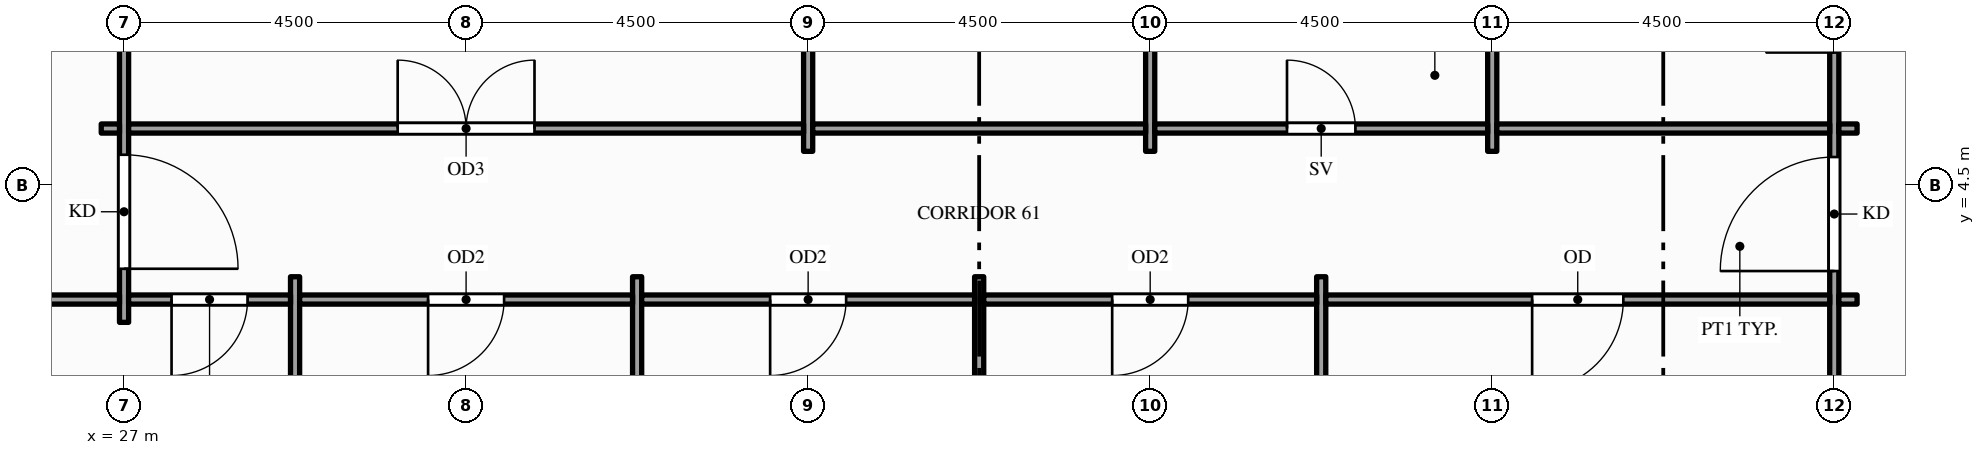
"""IFC4 building model, lengths in metres.
Left out: names, types, materials, properties, quantities, classifications, styles, units other than length and angle.
Written with IfcOpenShell. Run it as: python <this file> out.ifc"""

import sys

from ifc_helpers import new_model, si_unit, direction, frame, frame_2d, origin, place, context, subcontext, project, spatial, rectangle, extrude, element, fill, save


model = new_model("IFC4")
c1 = context("Model", 3, precision=1e-05, world=origin(), true_north=direction((0.0, 1.0)))
c2 = subcontext(c1, "Body", "Model", "MODEL_VIEW")
j1 = project(units=[si_unit("LENGTHUNIT", "METRE"), si_unit("PLANEANGLEUNIT", "RADIAN")], contexts=[c1])
p1 = place(None, origin())
s1 = spatial("IfcSite", under=j1, at=p1, CompositionType="ELEMENT")
p2 = place(p1, origin())
s2 = spatial("IfcBuilding", under=s1, at=p2, CompositionType="ELEMENT")
p3 = place(p2, frame((0.0, 0.0, 195.0)))
s3 = spatial("IfcBuildingStorey", under=s2, at=p3, CompositionType="ELEMENT", Elevation=195.0)
p4 = place(p3, frame((27.0, 2.7, 0.0), z_axis=(0.0, 0.0, 1.0), x_axis=(0.0, 1.0, 0.0)))
e1 = element("IfcWall", 1, at=p4, inside=s3, PredefinedType="PARTITIONING", context=c2, shape_type="SweptSolid", body=[
    extrude(rectangle(XDim=14.1, YDim=0.12, at=frame_2d((7.05, 0.0))), origin(), (0.0, 0.0, 1.0), 2.87),
])
p5 = place(p4, frame((0.705, 0.0, 0.0)))
e2 = element("IfcOpeningElement", 2, at=p5, cuts=e1, PredefinedType="OPENING", context=c2, shape_type="SweptSolid", body=[
    extrude(rectangle(XDim=1.5, YDim=2.1, at=frame_2d((0.75, 1.05))), frame((0.0, 0.07, 0.0), z_axis=(0.0, -1.0, 0.0), x_axis=(1.0, 0.0, 0.0)), (0.0, 0.0, 1.0), 0.14),
])
p6 = place(p4, frame((11.895, 0.0, 0.0)))
e3 = element("IfcOpeningElement", 3, at=p6, cuts=e1, PredefinedType="OPENING", context=c2, shape_type="SweptSolid", body=[
    extrude(rectangle(XDim=1.5, YDim=2.1, at=frame_2d((0.75, 1.05))), frame((0.0, 0.07, 0.0), z_axis=(0.0, -1.0, 0.0), x_axis=(1.0, 0.0, 0.0)), (0.0, 0.0, 1.0), 0.14),
])
for number, where, z_axis, x_axis in (
    (4, (29.25, -1.35, 0.0), (0.0, 0.0, 1.0), (0.0, 1.0, 0.0)),
    (5, (33.75, -1.35, 0.0), (0.0, 0.0, 1.0), (0.0, 1.0, 0.0)),
):
    element("IfcWall", number, at=place(p3, frame(where, z_axis=z_axis, x_axis=x_axis)), inside=s3, PredefinedType="PARTITIONING", context=c2, shape_type="SweptSolid", body=[
        extrude(rectangle(XDim=4.65, YDim=0.12, at=frame_2d((2.325, 0.0))), origin(), (0.0, 0.0, 1.0), 2.87),
    ])
p7 = place(p3, frame((36.0, 4.95, 0.0), z_axis=(0.0, 0.0, 1.0), x_axis=(0.0, 1.0, 0.0)))
e6 = element("IfcWall", 6, at=p7, inside=s3, PredefinedType="PARTITIONING", context=c2, shape_type="SweptSolid", body=[
    extrude(rectangle(XDim=9.6, YDim=0.12, at=frame_2d((4.8, 0.0))), origin(), (0.0, 0.0, 1.0), 2.87),
])
p8 = place(p3, frame((38.25, -1.35, 0.0), z_axis=(0.0, 0.0, 1.0), x_axis=(0.0, 1.0, 0.0)))
e7 = element("IfcWall", 7, at=p8, inside=s3, PredefinedType="PARTITIONING", context=c2, shape_type="SweptSolid", body=[
    extrude(rectangle(XDim=4.65, YDim=0.12, at=frame_2d((2.325, 0.0))), origin(), (0.0, 0.0, 1.0), 2.87),
])
p9 = place(p3, frame((40.5, 4.95, 0.0), z_axis=(0.0, 0.0, 1.0), x_axis=(0.0, 1.0, 0.0)))
e8 = element("IfcWall", 8, at=p9, inside=s3, PredefinedType="PARTITIONING", context=c2, shape_type="SweptSolid", body=[
    extrude(rectangle(XDim=9.6, YDim=0.12, at=frame_2d((4.8, 0.0))), origin(), (0.0, 0.0, 1.0), 2.87),
])
p10 = place(p3, frame((42.75, -1.35, 0.0), z_axis=(0.0, 0.0, 1.0), x_axis=(0.0, 1.0, 0.0)))
e9 = element("IfcWall", 9, at=p10, inside=s3, PredefinedType="PARTITIONING", context=c2, shape_type="SweptSolid", body=[
    extrude(rectangle(XDim=4.65, YDim=0.12, at=frame_2d((2.325, 0.0))), origin(), (0.0, 0.0, 1.0), 2.87),
])
p11 = place(p3, frame((45.0, 4.95, 0.0), z_axis=(0.0, 0.0, 1.0), x_axis=(0.0, 1.0, 0.0)))
e10 = element("IfcWall", 10, at=p11, inside=s3, PredefinedType="PARTITIONING", context=c2, shape_type="SweptSolid", body=[
    extrude(rectangle(XDim=9.6, YDim=0.12, at=frame_2d((4.8, 0.0))), origin(), (0.0, 0.0, 1.0), 2.87),
])
p12 = place(p3, frame((49.5, -1.35, 0.0), z_axis=(0.0, 0.0, 1.0), x_axis=(0.0, 1.0, 0.0)))
e11 = element("IfcWall", 11, at=p12, inside=s3, PredefinedType="PARTITIONING", context=c2, shape_type="SweptSolid", body=[
    extrude(rectangle(XDim=22.2, YDim=0.12, at=frame_2d((11.1, 0.0))), origin(), (0.0, 0.0, 1.0), 2.87),
])
p13 = place(p12, frame((4.725, 0.0, 0.0)))
e12 = element("IfcOpeningElement", 12, at=p13, cuts=e11, PredefinedType="OPENING", context=c2, shape_type="SweptSolid", body=[
    extrude(rectangle(XDim=1.5, YDim=2.1, at=frame_2d((0.75, 1.05))), frame((0.0, 0.07, 0.0), z_axis=(0.0, -1.0, 0.0), x_axis=(1.0, 0.0, 0.0)), (0.0, 0.0, 1.0), 0.14),
])
p14 = place(p12, frame((15.975, 0.0, 0.0)))
e13 = element("IfcOpeningElement", 13, at=p14, cuts=e11, PredefinedType="OPENING", context=c2, shape_type="SweptSolid", body=[
    extrude(rectangle(XDim=1.5, YDim=2.1, at=frame_2d((0.75, 1.05))), frame((0.0, 0.07, 0.0), z_axis=(0.0, -1.0, 0.0), x_axis=(1.0, 0.0, 0.0)), (0.0, 0.0, 1.0), 0.14),
])
p15 = place(p12, frame((7.6, 0.0, 0.0)))
e14 = element("IfcOpeningElement", 14, at=p15, cuts=e11, PredefinedType="OPENING", context=c2, shape_type="SweptSolid", body=[
    extrude(rectangle(XDim=0.9, YDim=2.1, at=frame_2d((0.45, 1.05))), frame((0.0, 0.07, 0.0), z_axis=(0.0, -1.0, 0.0), x_axis=(1.0, 0.0, 0.0)), (0.0, 0.0, 1.0), 0.14),
])
p16 = place(p12, frame((10.65, 0.0, 0.0)))
e15 = element("IfcOpeningElement", 15, at=p16, cuts=e11, PredefinedType="OPENING", context=c2, shape_type="SweptSolid", body=[
    extrude(rectangle(XDim=0.9, YDim=2.1, at=frame_2d((0.45, 1.05))), frame((0.0, 0.07, 0.0), z_axis=(0.0, -1.0, 0.0), x_axis=(1.0, 0.0, 0.0)), (0.0, 0.0, 1.0), 0.14),
])
p17 = place(p12, frame((13.6, 0.0, 0.0)))
e16 = element("IfcOpeningElement", 16, at=p17, cuts=e11, PredefinedType="OPENING", context=c2, shape_type="SweptSolid", body=[
    extrude(rectangle(XDim=1.0, YDim=2.1, at=frame_2d((0.5, 1.05))), frame((0.0, 0.07, 0.0), z_axis=(0.0, -1.0, 0.0), x_axis=(1.0, 0.0, 0.0)), (0.0, 0.0, 1.0), 0.14),
])
p18 = place(p3, frame((24.81, 3.0, 0.0), z_axis=(0.0, 0.0, 1.0), x_axis=(1.0, 0.0, 0.0)))
e17 = element("IfcWall", 17, at=p18, inside=s3, PredefinedType="PARTITIONING", context=c2, shape_type="SweptSolid", body=[
    extrude(rectangle(XDim=2.13, YDim=0.12, at=frame_2d((1.065, 0.0))), origin(), (0.0, 0.0, 1.0), 2.76),
])
p19 = place(p3, frame((27.06, 3.0, 0.0), z_axis=(0.0, 0.0, 1.0), x_axis=(1.0, 0.0, 0.0)))
e18 = element("IfcWall", 18, at=p19, inside=s3, PredefinedType="PARTITIONING", context=c2, shape_type="SweptSolid", body=[
    extrude(rectangle(XDim=2.13, YDim=0.12, at=frame_2d((1.065, 0.0))), origin(), (0.0, 0.0, 1.0), 2.87),
])
p20 = place(p19, frame((0.565, 0.0, 0.0)))
e19 = element("IfcOpeningElement", 19, at=p20, cuts=e18, PredefinedType="OPENING", context=c2, shape_type="SweptSolid", body=[
    extrude(rectangle(XDim=1.0, YDim=2.1, at=frame_2d((0.5, 1.05))), frame((0.0, 0.07, 0.0), z_axis=(0.0, -1.0, 0.0), x_axis=(1.0, 0.0, 0.0)), (0.0, 0.0, 1.0), 0.14),
])
p21 = place(p3, frame((29.31, 3.0, 0.0), z_axis=(0.0, 0.0, 1.0), x_axis=(1.0, 0.0, 0.0)))
e20 = element("IfcWall", 20, at=p21, inside=s3, PredefinedType="PARTITIONING", context=c2, shape_type="SweptSolid", body=[
    extrude(rectangle(XDim=4.38, YDim=0.12, at=frame_2d((2.19, 0.0))), origin(), (0.0, 0.0, 1.0), 2.87),
])
p22 = place(p21, frame((1.69, 0.0, 0.0)))
e21 = element("IfcOpeningElement", 21, at=p22, cuts=e20, PredefinedType="OPENING", context=c2, shape_type="SweptSolid", body=[
    extrude(rectangle(XDim=1.0, YDim=2.1, at=frame_2d((0.5, 1.05))), frame((0.0, 0.07, 0.0), z_axis=(0.0, -1.0, 0.0), x_axis=(1.0, 0.0, 0.0)), (0.0, 0.0, 1.0), 0.14),
])
p23 = place(p3, frame((33.81, 3.0, 0.0), z_axis=(0.0, 0.0, 1.0), x_axis=(1.0, 0.0, 0.0)))
e22 = element("IfcWall", 22, at=p23, inside=s3, PredefinedType="PARTITIONING", context=c2, shape_type="SweptSolid", body=[
    extrude(rectangle(XDim=4.38, YDim=0.12, at=frame_2d((2.19, 0.0))), origin(), (0.0, 0.0, 1.0), 2.87),
])
p24 = place(p23, frame((1.69, 0.0, 0.0)))
e23 = element("IfcOpeningElement", 23, at=p24, cuts=e22, PredefinedType="OPENING", context=c2, shape_type="SweptSolid", body=[
    extrude(rectangle(XDim=1.0, YDim=2.1, at=frame_2d((0.5, 1.05))), frame((0.0, 0.07, 0.0), z_axis=(0.0, -1.0, 0.0), x_axis=(1.0, 0.0, 0.0)), (0.0, 0.0, 1.0), 0.14),
])
p25 = place(p3, frame((38.31, 3.0, 0.0), z_axis=(0.0, 0.0, 1.0), x_axis=(1.0, 0.0, 0.0)))
e24 = element("IfcWall", 24, at=p25, inside=s3, PredefinedType="PARTITIONING", context=c2, shape_type="SweptSolid", body=[
    extrude(rectangle(XDim=4.38, YDim=0.12, at=frame_2d((2.19, 0.0))), origin(), (0.0, 0.0, 1.0), 2.87),
])
p26 = place(p25, frame((1.69, 0.0, 0.0)))
e25 = element("IfcOpeningElement", 25, at=p26, cuts=e24, PredefinedType="OPENING", context=c2, shape_type="SweptSolid", body=[
    extrude(rectangle(XDim=1.0, YDim=2.1, at=frame_2d((0.5, 1.05))), frame((0.0, 0.07, 0.0), z_axis=(0.0, -1.0, 0.0), x_axis=(1.0, 0.0, 0.0)), (0.0, 0.0, 1.0), 0.14),
])
p27 = place(p3, frame((42.81, 3.0, 0.0), z_axis=(0.0, 0.0, 1.0), x_axis=(1.0, 0.0, 0.0)))
e26 = element("IfcWall", 26, at=p27, inside=s3, PredefinedType="PARTITIONING", context=c2, shape_type="SweptSolid", body=[
    extrude(rectangle(XDim=6.63, YDim=0.12, at=frame_2d((3.315, 0.0))), origin(), (0.0, 0.0, 1.0), 2.87),
])
p28 = place(p27, frame((2.715, 0.0, 0.0)))
e27 = element("IfcOpeningElement", 27, at=p28, cuts=e26, PredefinedType="OPENING", context=c2, shape_type="SweptSolid", body=[
    extrude(rectangle(XDim=1.2, YDim=2.1, at=frame_2d((0.6, 1.05))), frame((0.0, 0.07, 0.0), z_axis=(0.0, -1.0, 0.0), x_axis=(1.0, 0.0, 0.0)), (0.0, 0.0, 1.0), 0.14),
])
for number, where, z_axis, x_axis in (
    (28, (49.56, 3.0, 0.0), (0.0, 0.0, 1.0), (1.0, 0.0, 0.0)),
    (29, (26.7, 5.25, 0.0), (0.0, 0.0, 1.0), (1.0, 0.0, 0.0)),
):
    element("IfcWall", number, at=place(p3, frame(where, z_axis=z_axis, x_axis=x_axis)), inside=s3, PredefinedType="PARTITIONING", context=c2, shape_type="SweptSolid", body=[
        extrude(rectangle(XDim=0.24, YDim=0.12, at=frame_2d((0.12, 0.0))), origin(), (0.0, 0.0, 1.0), 2.87),
    ])
p29 = place(p3, frame((27.06, 5.25, 0.0), z_axis=(0.0, 0.0, 1.0), x_axis=(1.0, 0.0, 0.0)))
e30 = element("IfcWall", 30, at=p29, inside=s3, PredefinedType="PARTITIONING", context=c2, shape_type="SweptSolid", body=[
    extrude(rectangle(XDim=8.88, YDim=0.12, at=frame_2d((4.44, 0.0))), origin(), (0.0, 0.0, 1.0), 2.87),
])
p30 = place(p29, frame((3.54, 0.0, 0.0)))
e31 = element("IfcOpeningElement", 31, at=p30, cuts=e30, PredefinedType="OPENING", context=c2, shape_type="SweptSolid", body=[
    extrude(rectangle(XDim=1.8, YDim=2.1, at=frame_2d((0.9, 1.05))), frame((0.0, 0.07, 0.0), z_axis=(0.0, -1.0, 0.0), x_axis=(1.0, 0.0, 0.0)), (0.0, 0.0, 1.0), 0.14),
])
p31 = place(p3, frame((36.06, 5.25, 0.0), z_axis=(0.0, 0.0, 1.0), x_axis=(1.0, 0.0, 0.0)))
e32 = element("IfcWall", 32, at=p31, inside=s3, PredefinedType="PARTITIONING", context=c2, shape_type="SweptSolid", body=[
    extrude(rectangle(XDim=4.38, YDim=0.12, at=frame_2d((2.19, 0.0))), origin(), (0.0, 0.0, 1.0), 2.87),
])
p32 = place(p3, frame((40.56, 5.25, 0.0), z_axis=(0.0, 0.0, 1.0), x_axis=(1.0, 0.0, 0.0)))
e33 = element("IfcWall", 33, at=p32, inside=s3, PredefinedType="PARTITIONING", context=c2, shape_type="SweptSolid", body=[
    extrude(rectangle(XDim=4.38, YDim=0.12, at=frame_2d((2.19, 0.0))), origin(), (0.0, 0.0, 1.0), 2.87),
])
p33 = place(p32, frame((1.74, 0.0, 0.0)))
e34 = element("IfcOpeningElement", 34, at=p33, cuts=e33, PredefinedType="OPENING", context=c2, shape_type="SweptSolid", body=[
    extrude(rectangle(XDim=0.9, YDim=2.1, at=frame_2d((0.45, 1.05))), frame((0.0, 0.07, 0.0), z_axis=(0.0, -1.0, 0.0), x_axis=(1.0, 0.0, 0.0)), (0.0, 0.0, 1.0), 0.14),
])
p34 = place(p3, frame((45.06, 5.25, 0.0), z_axis=(0.0, 0.0, 1.0), x_axis=(1.0, 0.0, 0.0)))
e35 = element("IfcWall", 35, at=p34, inside=s3, PredefinedType="PARTITIONING", context=c2, shape_type="SweptSolid", body=[
    extrude(rectangle(XDim=4.38, YDim=0.12, at=frame_2d((2.19, 0.0))), origin(), (0.0, 0.0, 1.0), 2.87),
])
p35 = place(p3, frame((49.56, 5.25, 0.0), z_axis=(0.0, 0.0, 1.0), x_axis=(1.0, 0.0, 0.0)))
e36 = element("IfcWall", 36, at=p35, inside=s3, PredefinedType="PARTITIONING", context=c2, shape_type="SweptSolid", body=[
    extrude(rectangle(XDim=0.24, YDim=0.12, at=frame_2d((0.12, 0.0))), origin(), (0.0, 0.0, 1.0), 2.87),
])
p36 = place(p5, origin())
e37 = element("IfcDoor", 37, at=p36, inside=s3, OperationType="SINGLE_SWING_LEFT", PredefinedType="DOOR", context=c2, shape_type="SweptSolid", body=[
    extrude(rectangle(XDim=1.5, YDim=2.1, at=frame_2d((0.75, 1.05))), frame((0.0, 0.025, 0.0), z_axis=(0.0, -1.0, 0.0), x_axis=(1.0, 0.0, 0.0)), (0.0, 0.0, 1.0), 0.05),
])
fill(e2, e37)
p37 = place(p13, origin())
e38 = element("IfcDoor", 38, at=p37, inside=s3, OperationType="SINGLE_SWING_LEFT", PredefinedType="DOOR", context=c2, shape_type="SweptSolid", body=[
    extrude(rectangle(XDim=1.5, YDim=2.1, at=frame_2d((0.75, 1.05))), frame((0.0, 0.025, 0.0), z_axis=(0.0, -1.0, 0.0), x_axis=(1.0, 0.0, 0.0)), (0.0, 0.0, 1.0), 0.05),
])
fill(e12, e38)
p38 = place(p30, origin())
e39 = element("IfcDoor", 39, at=p38, inside=s3, OperationType="DOUBLE_DOOR_SINGLE_SWING", PredefinedType="DOOR", context=c2, shape_type="SweptSolid", body=[
    extrude(rectangle(XDim=1.8, YDim=2.1, at=frame_2d((0.9, 1.05))), frame((0.0, 0.025, 0.0), z_axis=(0.0, -1.0, 0.0), x_axis=(1.0, 0.0, 0.0)), (0.0, 0.0, 1.0), 0.05),
])
fill(e31, e39)
p39 = place(p33, origin())
e40 = element("IfcDoor", 40, at=p39, inside=s3, OperationType="SINGLE_SWING_LEFT", PredefinedType="DOOR", context=c2, shape_type="SweptSolid", body=[
    extrude(rectangle(XDim=0.9, YDim=2.1, at=frame_2d((0.45, 1.05))), frame((0.0, 0.025, 0.0), z_axis=(0.0, -1.0, 0.0), x_axis=(1.0, 0.0, 0.0)), (0.0, 0.0, 1.0), 0.05),
])
fill(e34, e40)
p40 = place(p20, origin())
e41 = element("IfcDoor", 41, at=p40, inside=s3, OperationType="SINGLE_SWING_LEFT", PredefinedType="DOOR", context=c2, shape_type="SweptSolid", body=[
    extrude(rectangle(XDim=1.0, YDim=2.1, at=frame_2d((0.5, 1.05))), frame((0.0, 0.025, 0.0), z_axis=(0.0, -1.0, 0.0), x_axis=(1.0, 0.0, 0.0)), (0.0, 0.0, 1.0), 0.05),
])
fill(e19, e41)
p41 = place(p22, origin())
e42 = element("IfcDoor", 42, at=p41, inside=s3, OperationType="SINGLE_SWING_LEFT", PredefinedType="DOOR", context=c2, shape_type="SweptSolid", body=[
    extrude(rectangle(XDim=1.0, YDim=2.1, at=frame_2d((0.5, 1.05))), frame((0.0, 0.025, 0.0), z_axis=(0.0, -1.0, 0.0), x_axis=(1.0, 0.0, 0.0)), (0.0, 0.0, 1.0), 0.05),
])
fill(e21, e42)
p42 = place(p24, origin())
e43 = element("IfcDoor", 43, at=p42, inside=s3, OperationType="SINGLE_SWING_LEFT", PredefinedType="DOOR", context=c2, shape_type="SweptSolid", body=[
    extrude(rectangle(XDim=1.0, YDim=2.1, at=frame_2d((0.5, 1.05))), frame((0.0, 0.025, 0.0), z_axis=(0.0, -1.0, 0.0), x_axis=(1.0, 0.0, 0.0)), (0.0, 0.0, 1.0), 0.05),
])
fill(e23, e43)
p43 = place(p26, origin())
e44 = element("IfcDoor", 44, at=p43, inside=s3, OperationType="SINGLE_SWING_LEFT", PredefinedType="DOOR", context=c2, shape_type="SweptSolid", body=[
    extrude(rectangle(XDim=1.0, YDim=2.1, at=frame_2d((0.5, 1.05))), frame((0.0, 0.025, 0.0), z_axis=(0.0, -1.0, 0.0), x_axis=(1.0, 0.0, 0.0)), (0.0, 0.0, 1.0), 0.05),
])
fill(e25, e44)
p44 = place(p28, origin())
e45 = element("IfcDoor", 45, at=p44, inside=s3, OperationType="SINGLE_SWING_LEFT", PredefinedType="DOOR", context=c2, shape_type="SweptSolid", body=[
    extrude(rectangle(XDim=1.2, YDim=2.1, at=frame_2d((0.6, 1.05))), frame((0.0, 0.025, 0.0), z_axis=(0.0, -1.0, 0.0), x_axis=(1.0, 0.0, 0.0)), (0.0, 0.0, 1.0), 0.05),
])
fill(e27, e45)
save(model, sys.argv[1])
